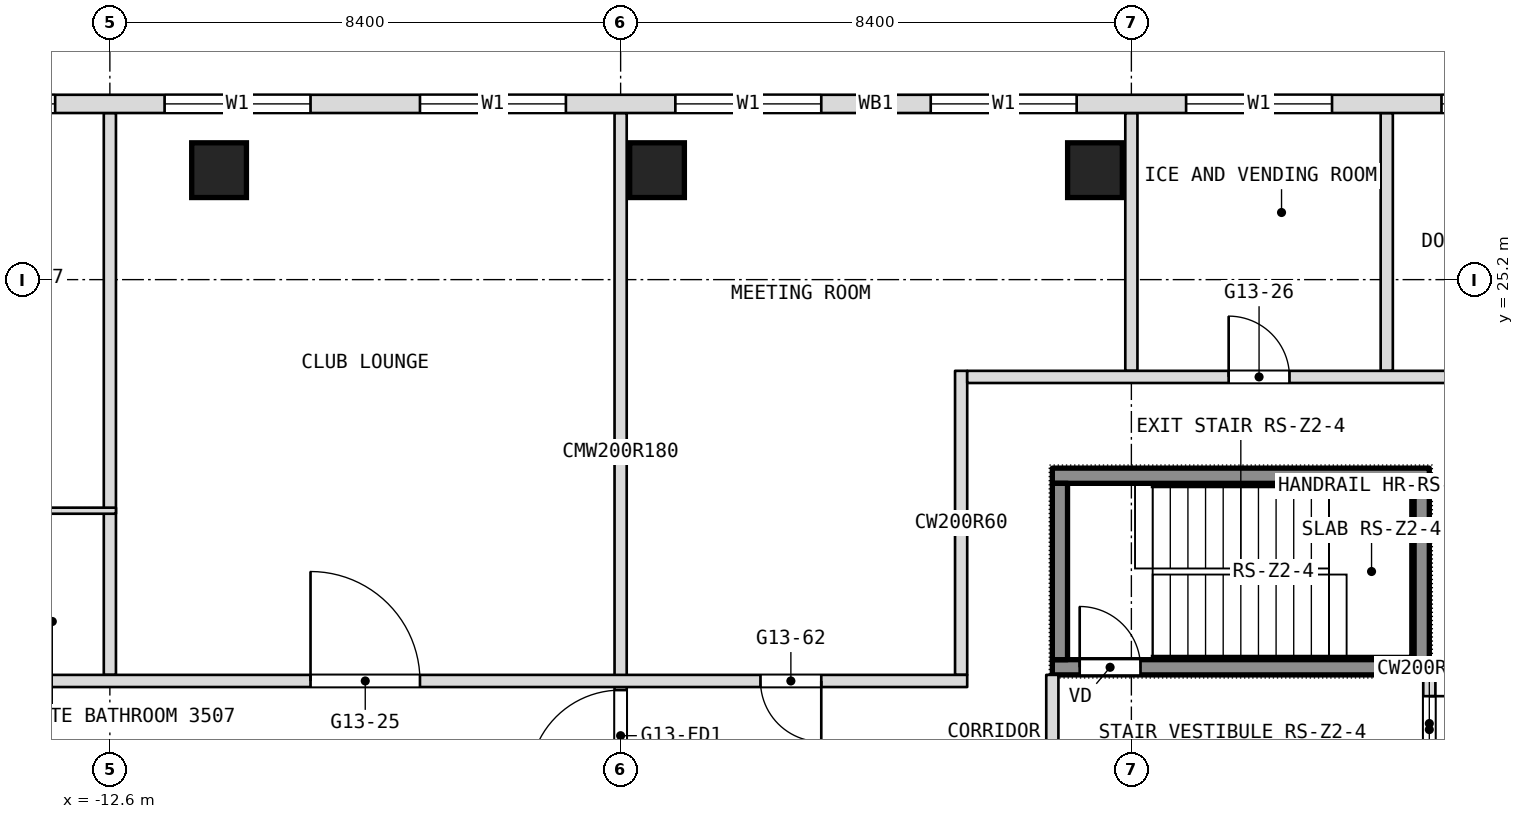
"""IFC4 building model, lengths in metres.
Left out: names, types, materials, properties, quantities, classifications, styles, units other than length and angle.
Written with IfcOpenShell. Run it as: python <this file> out.ifc"""

import sys

from ifc_helpers import new_model, si_unit, direction, frame, frame_2d, origin, origin_2d, place, context, subcontext, project, spatial, rectangle, extrude, element, fill, save


model = new_model("IFC4")
c1 = context("Model", 3, precision=1e-05, world=origin(), true_north=direction((0.0, 1.0)))
c2 = subcontext(c1, "Body", "Model", "MODEL_VIEW")
j1 = project(units=[si_unit("LENGTHUNIT", "METRE"), si_unit("PLANEANGLEUNIT", "RADIAN")], contexts=[c1])
p1 = place(None, origin())
s1 = spatial("IfcSite", under=j1, at=p1, CompositionType="ELEMENT")
p2 = place(p1, origin())
s2 = spatial("IfcBuilding", under=s1, at=p2, CompositionType="ELEMENT")
p3 = place(p2, frame((0.0, 0.0, 151.7)))
s3 = spatial("IfcBuildingStorey", under=s2, at=p3, CompositionType="ELEMENT", Elevation=151.7)
for number, where, z_axis, x_axis in (
    (1, (-10.804, 27.0, 0.0), (0.0, 0.0, 1.0), (1.0, 0.0, 0.0)),
    (2, (-3.601, 27.0, 0.0), (0.0, 0.0, 1.0), (1.0, 0.0, 0.0)),
    (3, (3.601, 27.0, 0.0), (0.0, 0.0, 1.0), (1.0, 0.0, 0.0)),
):
    element("IfcColumn", number, at=place(p3, frame(where, z_axis=z_axis, x_axis=x_axis)), inside=s3, PredefinedType="COLUMN", context=c2, shape_type="SweptSolid", body=[
        extrude(rectangle(XDim=0.9, YDim=0.9, at=origin_2d()), origin(), (0.0, 0.0, 1.0), 3.6),
    ])
p4 = place(p3, frame((9.1, 16.9, 0.0), z_axis=(0.0, 0.0, 1.0), x_axis=(0.0, 1.0, 0.0)))
e4 = element("IfcWall", 4, at=p4, inside=s3, PredefinedType="PARTITIONING", context=c2, shape_type="SweptSolid", body=[
    extrude(rectangle(XDim=1.8, YDim=0.2, at=frame_2d((0.9, 0.0))), origin(), (0.0, 0.0, 1.0), 3.34),
])
p5 = place(p4, frame((0.55, 0.0, 0.0)))
e5 = element("IfcOpeningElement", 5, at=p5, cuts=e4, PredefinedType="OPENING", context=c2, shape_type="SweptSolid", body=[
    extrude(rectangle(XDim=0.9, YDim=2.1, at=frame_2d((0.45, 1.05))), frame((0.0, 0.1, 0.0), z_axis=(0.0, -1.0, 0.0), x_axis=(1.0, 0.0, 0.0)), (0.0, 0.0, 1.0), 0.2),
])
for number, where, z_axis, x_axis in (
    (6, (8.4, 23.7, 0.0), (0.0, 0.0, 1.0), (0.0, 1.0, 0.0)),
    (7, (4.2, 23.7, 0.0), (0.0, 0.0, 1.0), (0.0, 1.0, 0.0)),
):
    element("IfcWall", number, at=place(p3, frame(where, z_axis=z_axis, x_axis=x_axis)), inside=s3, PredefinedType="PARTITIONING", context=c2, shape_type="SweptSolid", body=[
        extrude(rectangle(XDim=4.24, YDim=0.2, at=frame_2d((2.12, 0.0))), origin(), (0.0, 0.0, 1.0), 3.34),
    ])
p6 = place(p3, frame((2.9, 16.9, 0.0), z_axis=(0.0, 0.0, 1.0), x_axis=(0.0, 1.0, 0.0)))
e8 = element("IfcWall", 8, at=p6, inside=s3, PredefinedType="PARTITIONING", context=c2, shape_type="SweptSolid", body=[
    extrude(rectangle(XDim=1.8, YDim=0.2, at=frame_2d((0.9, 0.0))), origin(), (0.0, 0.0, 1.0), 3.34),
])
p7 = place(p3, frame((1.4, 18.7, 0.0), z_axis=(0.0, 0.0, 1.0), x_axis=(0.0, 1.0, 0.0)))
e9 = element("IfcWall", 9, at=p7, inside=s3, PredefinedType="PARTITIONING", context=c2, shape_type="SweptSolid", body=[
    extrude(rectangle(XDim=5.0, YDim=0.2, at=frame_2d((2.5, 0.0))), origin(), (0.0, 0.0, 1.0), 3.34),
])
p8 = place(p3, frame((-4.2, 16.8, 0.0), z_axis=(0.0, 0.0, 1.0), x_axis=(0.0, 1.0, 0.0)))
e10 = element("IfcWall", 10, at=p8, inside=s3, PredefinedType="PARTITIONING", context=c2, shape_type="SweptSolid", body=[
    extrude(rectangle(XDim=11.14, YDim=0.2, at=frame_2d((5.57, 0.0))), origin(), (0.0, 0.0, 1.0), 3.34),
])
p9 = place(p8, frame((0.15, 0.0, 0.0)))
e11 = element("IfcOpeningElement", 11, at=p9, cuts=e10, PredefinedType="OPENING", context=c2, shape_type="SweptSolid", body=[
    extrude(rectangle(XDim=1.5, YDim=2.1, at=frame_2d((0.75, 1.05))), frame((0.0, 0.1, 0.0), z_axis=(0.0, -1.0, 0.0), x_axis=(1.0, 0.0, 0.0)), (0.0, 0.0, 1.0), 0.2),
])
p10 = place(p3, frame((-12.6, 18.7, 0.0), z_axis=(0.0, 0.0, 1.0), x_axis=(0.0, 1.0, 0.0)))
e12 = element("IfcWall", 12, at=p10, inside=s3, PredefinedType="PARTITIONING", context=c2, shape_type="SweptSolid", body=[
    extrude(rectangle(XDim=9.24, YDim=0.2, at=frame_2d((4.62, 0.0))), origin(), (0.0, 0.0, 1.0), 3.34),
])
p11 = place(p3, frame((-16.9, 18.6, 0.0), z_axis=(0.0, 0.0, 1.0), x_axis=(1.0, 0.0, 0.0)))
e13 = element("IfcWall", 13, at=p11, inside=s3, PredefinedType="PARTITIONING", context=c2, shape_type="SweptSolid", body=[
    extrude(rectangle(XDim=18.4, YDim=0.2, at=frame_2d((9.2, 0.0))), origin(), (0.0, 0.0, 1.0), 3.34),
])
p12 = place(p11, frame((0.5, 0.0, 0.0)))
e14 = element("IfcOpeningElement", 14, at=p12, cuts=e13, PredefinedType="OPENING", context=c2, shape_type="SweptSolid", body=[
    extrude(rectangle(XDim=1.0, YDim=2.1, at=frame_2d((0.5, 1.05))), frame((0.0, 0.1, 0.0), z_axis=(0.0, -1.0, 0.0), x_axis=(1.0, 0.0, 0.0)), (0.0, 0.0, 1.0), 0.2),
])
p13 = place(p11, frame((7.6, 0.0, 0.0)))
e15 = element("IfcOpeningElement", 15, at=p13, cuts=e13, PredefinedType="OPENING", context=c2, shape_type="SweptSolid", body=[
    extrude(rectangle(XDim=1.8, YDim=2.1, at=frame_2d((0.9, 1.05))), frame((0.0, 0.1, 0.0), z_axis=(0.0, -1.0, 0.0), x_axis=(1.0, 0.0, 0.0)), (0.0, 0.0, 1.0), 0.2),
])
p14 = place(p11, frame((15.0, 0.0, 0.0)))
e16 = element("IfcOpeningElement", 16, at=p14, cuts=e13, PredefinedType="OPENING", context=c2, shape_type="SweptSolid", body=[
    extrude(rectangle(XDim=1.0, YDim=2.1, at=frame_2d((0.5, 1.05))), frame((0.0, 0.1, 0.0), z_axis=(0.0, -1.0, 0.0), x_axis=(1.0, 0.0, 0.0)), (0.0, 0.0, 1.0), 0.2),
])
p15 = place(p3, frame((-15.05, 21.4, 0.0), z_axis=(0.0, 0.0, 1.0), x_axis=(1.0, 0.0, 0.0)))
e17 = element("IfcWall", 17, at=p15, inside=s3, PredefinedType="PARTITIONING", context=c2, shape_type="SweptSolid", body=[
    extrude(rectangle(XDim=2.55, YDim=0.1, at=frame_2d((1.275, 0.0))), origin(), (0.0, 0.0, 1.0), 3.34),
])
p16 = place(p15, frame((0.15, 0.0, 0.0)))
e18 = element("IfcOpeningElement", 18, at=p16, cuts=e17, PredefinedType="OPENING", context=c2, shape_type="SweptSolid", body=[
    extrude(rectangle(XDim=0.9, YDim=2.1, at=frame_2d((0.45, 1.05))), frame((0.0, 0.05, 0.0), z_axis=(0.0, -1.0, 0.0), x_axis=(1.0, 0.0, 0.0)), (0.0, 0.0, 1.0), 0.1),
])
p17 = place(p3, frame((1.5, 23.6, 0.0), z_axis=(0.0, 0.0, 1.0), x_axis=(1.0, 0.0, 0.0)))
e19 = element("IfcWall", 19, at=p17, inside=s3, PredefinedType="PARTITIONING", context=c2, shape_type="SweptSolid", body=[
    extrude(rectangle(XDim=9.2, YDim=0.2, at=frame_2d((4.6, 0.0))), origin(), (0.0, 0.0, 1.0), 3.34),
])
p18 = place(p17, frame((4.3, 0.0, 0.0)))
e20 = element("IfcOpeningElement", 20, at=p18, cuts=e19, PredefinedType="OPENING", context=c2, shape_type="SweptSolid", body=[
    extrude(rectangle(XDim=1.0, YDim=2.1, at=frame_2d((0.5, 1.05))), frame((0.0, 0.1, 0.0), z_axis=(0.0, -1.0, 0.0), x_axis=(1.0, 0.0, 0.0)), (0.0, 0.0, 1.0), 0.2),
])
p19 = place(p3, frame((21.306, 28.09, 0.0), z_axis=(0.0, 0.0, 1.0), x_axis=(-1.0, 0.0, 0.0)))
e21 = element("IfcWall", 21, at=p19, inside=s3, PredefinedType="NOTDEFINED", context=c2, shape_type="SweptSolid", body=[
    extrude(rectangle(XDim=42.612, YDim=0.3, at=frame_2d((21.306, 0.0))), origin(), (0.0, 0.0, 1.0), 3.6),
])
p20 = place(p19, frame((5.406, 0.0, 0.9)))
e22 = element("IfcOpeningElement", 22, at=p20, cuts=e21, PredefinedType="OPENING", context=c2, shape_type="SweptSolid", body=[
    extrude(rectangle(XDim=2.4, YDim=2.1, at=frame_2d((1.2, 1.05))), frame((0.0, 0.15, 0.0), z_axis=(0.0, -1.0, 0.0), x_axis=(1.0, 0.0, 0.0)), (0.0, 0.0, 1.0), 0.3),
])
p21 = place(p19, frame((9.606, 0.0, 0.9)))
e23 = element("IfcOpeningElement", 23, at=p21, cuts=e21, PredefinedType="OPENING", context=c2, shape_type="SweptSolid", body=[
    extrude(rectangle(XDim=2.4, YDim=2.1, at=frame_2d((1.2, 1.05))), frame((0.0, 0.15, 0.0), z_axis=(0.0, -1.0, 0.0), x_axis=(1.0, 0.0, 0.0)), (0.0, 0.0, 1.0), 0.3),
])
p22 = place(p19, frame((13.806, 0.0, 0.9)))
e24 = element("IfcOpeningElement", 24, at=p22, cuts=e21, PredefinedType="OPENING", context=c2, shape_type="SweptSolid", body=[
    extrude(rectangle(XDim=2.4, YDim=2.1, at=frame_2d((1.2, 1.05))), frame((0.0, 0.15, 0.0), z_axis=(0.0, -1.0, 0.0), x_axis=(1.0, 0.0, 0.0)), (0.0, 0.0, 1.0), 0.3),
])
p23 = place(p19, frame((18.006, 0.0, 0.9)))
e25 = element("IfcOpeningElement", 25, at=p23, cuts=e21, PredefinedType="OPENING", context=c2, shape_type="SweptSolid", body=[
    extrude(rectangle(XDim=2.4, YDim=2.1, at=frame_2d((1.2, 1.05))), frame((0.0, 0.15, 0.0), z_axis=(0.0, -1.0, 0.0), x_axis=(1.0, 0.0, 0.0)), (0.0, 0.0, 1.0), 0.3),
])
p24 = place(p19, frame((22.206, 0.0, 0.9)))
e26 = element("IfcOpeningElement", 26, at=p24, cuts=e21, PredefinedType="OPENING", context=c2, shape_type="SweptSolid", body=[
    extrude(rectangle(XDim=2.4, YDim=2.1, at=frame_2d((1.2, 1.05))), frame((0.0, 0.15, 0.0), z_axis=(0.0, -1.0, 0.0), x_axis=(1.0, 0.0, 0.0)), (0.0, 0.0, 1.0), 0.3),
])
p25 = place(p19, frame((26.406, 0.0, 0.9)))
e27 = element("IfcOpeningElement", 27, at=p25, cuts=e21, PredefinedType="OPENING", context=c2, shape_type="SweptSolid", body=[
    extrude(rectangle(XDim=2.4, YDim=2.1, at=frame_2d((1.2, 1.05))), frame((0.0, 0.15, 0.0), z_axis=(0.0, -1.0, 0.0), x_axis=(1.0, 0.0, 0.0)), (0.0, 0.0, 1.0), 0.3),
])
p26 = place(p19, frame((30.606, 0.0, 0.9)))
e28 = element("IfcOpeningElement", 28, at=p26, cuts=e21, PredefinedType="OPENING", context=c2, shape_type="SweptSolid", body=[
    extrude(rectangle(XDim=2.4, YDim=2.1, at=frame_2d((1.2, 1.05))), frame((0.0, 0.15, 0.0), z_axis=(0.0, -1.0, 0.0), x_axis=(1.0, 0.0, 0.0)), (0.0, 0.0, 1.0), 0.3),
])
p27 = place(p19, frame((34.806, 0.0, 0.9)))
e29 = element("IfcOpeningElement", 29, at=p27, cuts=e21, PredefinedType="OPENING", context=c2, shape_type="SweptSolid", body=[
    extrude(rectangle(XDim=2.4, YDim=2.1, at=frame_2d((1.2, 1.05))), frame((0.0, 0.15, 0.0), z_axis=(0.0, -1.0, 0.0), x_axis=(1.0, 0.0, 0.0)), (0.0, 0.0, 1.0), 0.3),
])
p28 = place(p3, frame((2.9, 18.825, 0.1), z_axis=(0.0, 0.0, 1.0), x_axis=(1.0, 0.0, 0.0)))
e30 = element("IfcWall", 30, at=p28, inside=s3, PredefinedType="SHEAR", context=c2, shape_type="SweptSolid", body=[
    extrude(rectangle(XDim=6.2, YDim=0.25, at=frame_2d((3.1, 0.0))), origin(), (0.0, 0.0, 1.0), 3.6),
])
p29 = place(p28, frame((0.45, 0.0, 0.0)))
e31 = element("IfcOpeningElement", 31, at=p29, cuts=e30, PredefinedType="OPENING", context=c2, shape_type="SweptSolid", body=[
    extrude(rectangle(XDim=1.0, YDim=2.1, at=frame_2d((0.5, 1.05))), frame((0.0, 0.125, 0.0), z_axis=(0.0, -1.0, 0.0), x_axis=(1.0, 0.0, 0.0)), (0.0, 0.0, 1.0), 0.25),
])
p30 = place(p3, frame((2.9, 21.975, 0.1), z_axis=(0.0, 0.0, 1.0), x_axis=(1.0, 0.0, 0.0)))
e32 = element("IfcWall", 32, at=p30, inside=s3, PredefinedType="SHEAR", context=c2, shape_type="SweptSolid", body=[
    extrude(rectangle(XDim=6.2, YDim=0.25, at=frame_2d((3.1, 0.0))), origin(), (0.0, 0.0, 1.0), 3.6),
])
for number, where, z_axis, x_axis in (
    (33, (3.025, 18.95, 0.1), (0.0, 0.0, 1.0), (0.0, 1.0, 0.0)),
    (34, (8.975, 18.95, 0.1), (0.0, 0.0, 1.0), (0.0, 1.0, 0.0)),
):
    element("IfcWall", number, at=place(p3, frame(where, z_axis=z_axis, x_axis=x_axis)), inside=s3, PredefinedType="SHEAR", context=c2, shape_type="SweptSolid", body=[
        extrude(rectangle(XDim=2.9, YDim=0.25, at=frame_2d((1.45, 0.0))), origin(), (0.0, 0.0, 1.0), 3.6),
    ])
p31 = place(p5, origin())
e35 = element("IfcDoor", 35, at=p31, inside=s3, OperationType="SINGLE_SWING_RIGHT", PredefinedType="DOOR", context=c2, shape_type="SweptSolid", body=[
    extrude(rectangle(XDim=0.9, YDim=2.1, at=frame_2d((0.45, 1.05))), frame((0.0, 0.025, 0.0), z_axis=(0.0, -1.0, 0.0), x_axis=(1.0, 0.0, 0.0)), (0.0, 0.0, 1.0), 0.05),
])
fill(e5, e35)
p32 = place(p13, origin())
e36 = element("IfcDoor", 36, at=p32, inside=s3, OperationType="DOUBLE_DOOR_SINGLE_SWING", PredefinedType="DOOR", context=c2, shape_type="SweptSolid", body=[
    extrude(rectangle(XDim=1.8, YDim=2.1, at=frame_2d((0.9, 1.05))), frame((0.0, 0.025, 0.0), z_axis=(0.0, -1.0, 0.0), x_axis=(1.0, 0.0, 0.0)), (0.0, 0.0, 1.0), 0.05),
])
fill(e15, e36)
p33 = place(p14, origin())
e37 = element("IfcDoor", 37, at=p33, inside=s3, OperationType="SINGLE_SWING_LEFT", PredefinedType="DOOR", context=c2, shape_type="SweptSolid", body=[
    extrude(rectangle(XDim=1.0, YDim=2.1, at=frame_2d((0.5, 1.05))), frame((0.0, 0.025, 0.0), z_axis=(0.0, -1.0, 0.0), x_axis=(1.0, 0.0, 0.0)), (0.0, 0.0, 1.0), 0.05),
])
fill(e16, e37)
p34 = place(p18, origin())
e38 = element("IfcDoor", 38, at=p34, inside=s3, OperationType="SINGLE_SWING_LEFT", PredefinedType="DOOR", context=c2, shape_type="SweptSolid", body=[
    extrude(rectangle(XDim=1.0, YDim=2.1, at=frame_2d((0.5, 1.05))), frame((0.0, 0.025, 0.0), z_axis=(0.0, -1.0, 0.0), x_axis=(1.0, 0.0, 0.0)), (0.0, 0.0, 1.0), 0.05),
])
fill(e20, e38)
p35 = place(p21, origin())
e39 = element("IfcWindow", 39, at=p35, inside=s3, PartitioningType="SINGLE_PANEL", PredefinedType="WINDOW", context=c2, shape_type="SweptSolid", body=[
    extrude(rectangle(XDim=2.4, YDim=2.1, at=frame_2d((1.2, 1.05))), frame((0.0, 0.03, 0.0), z_axis=(0.0, -1.0, 0.0), x_axis=(1.0, 0.0, 0.0)), (0.0, 0.0, 1.0), 0.06),
])
fill(e23, e39)
p36 = place(p22, origin())
e40 = element("IfcWindow", 40, at=p36, inside=s3, PartitioningType="SINGLE_PANEL", PredefinedType="WINDOW", context=c2, shape_type="SweptSolid", body=[
    extrude(rectangle(XDim=2.4, YDim=2.1, at=frame_2d((1.2, 1.05))), frame((0.0, 0.03, 0.0), z_axis=(0.0, -1.0, 0.0), x_axis=(1.0, 0.0, 0.0)), (0.0, 0.0, 1.0), 0.06),
])
fill(e24, e40)
p37 = place(p23, origin())
e41 = element("IfcWindow", 41, at=p37, inside=s3, PartitioningType="SINGLE_PANEL", PredefinedType="WINDOW", context=c2, shape_type="SweptSolid", body=[
    extrude(rectangle(XDim=2.4, YDim=2.1, at=frame_2d((1.2, 1.05))), frame((0.0, 0.03, 0.0), z_axis=(0.0, -1.0, 0.0), x_axis=(1.0, 0.0, 0.0)), (0.0, 0.0, 1.0), 0.06),
])
fill(e25, e41)
p38 = place(p24, origin())
e42 = element("IfcWindow", 42, at=p38, inside=s3, PartitioningType="SINGLE_PANEL", PredefinedType="WINDOW", context=c2, shape_type="SweptSolid", body=[
    extrude(rectangle(XDim=2.4, YDim=2.1, at=frame_2d((1.2, 1.05))), frame((0.0, 0.03, 0.0), z_axis=(0.0, -1.0, 0.0), x_axis=(1.0, 0.0, 0.0)), (0.0, 0.0, 1.0), 0.06),
])
fill(e26, e42)
p39 = place(p25, origin())
e43 = element("IfcWindow", 43, at=p39, inside=s3, PartitioningType="SINGLE_PANEL", PredefinedType="WINDOW", context=c2, shape_type="SweptSolid", body=[
    extrude(rectangle(XDim=2.4, YDim=2.1, at=frame_2d((1.2, 1.05))), frame((0.0, 0.03, 0.0), z_axis=(0.0, -1.0, 0.0), x_axis=(1.0, 0.0, 0.0)), (0.0, 0.0, 1.0), 0.06),
])
fill(e27, e43)
p40 = place(p26, origin())
e44 = element("IfcWindow", 44, at=p40, inside=s3, PartitioningType="SINGLE_PANEL", PredefinedType="WINDOW", context=c2, shape_type="SweptSolid", body=[
    extrude(rectangle(XDim=2.4, YDim=2.1, at=frame_2d((1.2, 1.05))), frame((0.0, 0.03, 0.0), z_axis=(0.0, -1.0, 0.0), x_axis=(1.0, 0.0, 0.0)), (0.0, 0.0, 1.0), 0.06),
])
fill(e28, e44)
p41 = place(p27, origin())
e45 = element("IfcWindow", 45, at=p41, inside=s3, PartitioningType="SINGLE_PANEL", PredefinedType="WINDOW", context=c2, shape_type="SweptSolid", body=[
    extrude(rectangle(XDim=2.4, YDim=2.1, at=frame_2d((1.2, 1.05))), frame((0.0, 0.03, 0.0), z_axis=(0.0, -1.0, 0.0), x_axis=(1.0, 0.0, 0.0)), (0.0, 0.0, 1.0), 0.06),
])
fill(e29, e45)
p42 = place(p29, origin())
e46 = element("IfcDoor", 46, at=p42, inside=s3, OperationType="SINGLE_SWING_LEFT", PredefinedType="DOOR", context=c2, shape_type="SweptSolid", body=[
    extrude(rectangle(XDim=1.0, YDim=2.1, at=frame_2d((0.5, 1.05))), frame((0.0, 0.025, 0.0), z_axis=(0.0, -1.0, 0.0), x_axis=(1.0, 0.0, 0.0)), (0.0, 0.0, 1.0), 0.05),
])
fill(e31, e46)
p43 = place(p9, origin())
e47 = element("IfcDoor", 47, at=p43, inside=s3, OperationType="DOUBLE_DOOR_DOUBLE_SWING", PredefinedType="DOOR", context=c2, shape_type="SweptSolid", body=[
    extrude(rectangle(XDim=1.5, YDim=2.1, at=frame_2d((0.75, 1.05))), frame((0.0, 0.025, 0.0), z_axis=(0.0, -1.0, 0.0), x_axis=(1.0, 0.0, 0.0)), (0.0, 0.0, 1.0), 0.05),
])
fill(e11, e47)
save(model, sys.argv[1])
